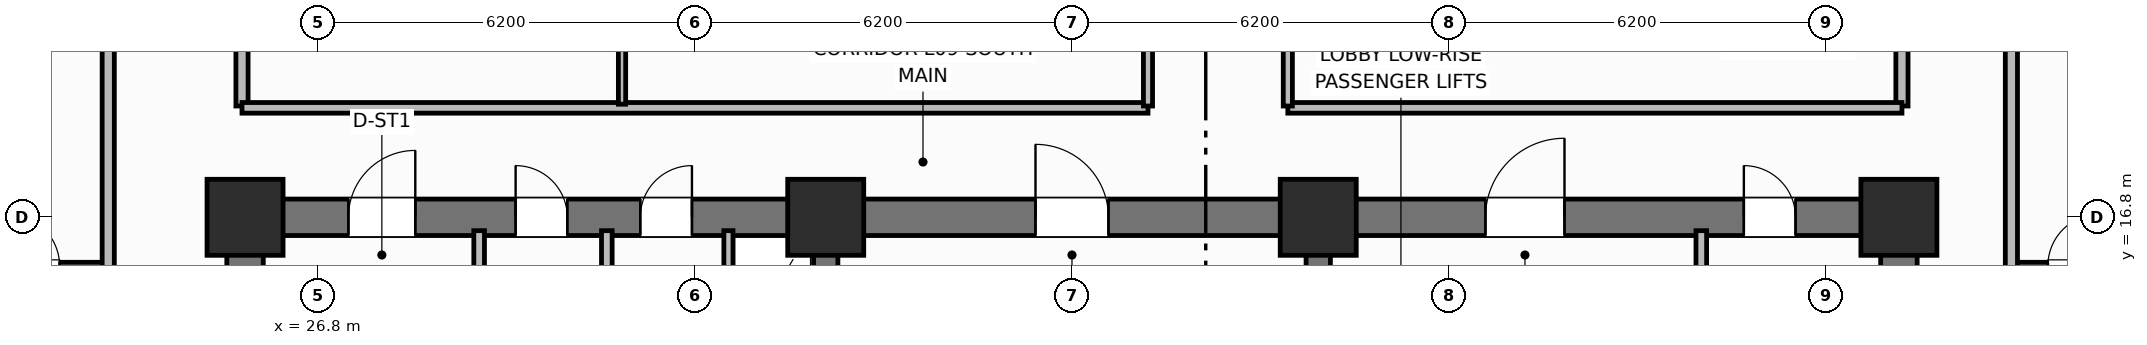
"""IFC4 building model, lengths in metres.
Left out: names, types, materials, properties, quantities, classifications, styles, units other than length and angle.
Written with IfcOpenShell. Run it as: python <this file> out.ifc"""

import sys

from ifc_helpers import new_model, si_unit, direction, frame, frame_2d, origin, origin_2d, place, context, subcontext, project, spatial, rectangle, extrude, element, fill, save


model = new_model("IFC4")
c1 = context("Model", 3, precision=1e-05, world=origin(), true_north=direction((0.0, 1.0)))
c2 = subcontext(c1, "Body", "Model", "MODEL_VIEW")
j1 = project(units=[si_unit("LENGTHUNIT", "METRE"), si_unit("PLANEANGLEUNIT", "RADIAN")], contexts=[c1])
p1 = place(None, origin())
s1 = spatial("IfcSite", under=j1, at=p1, CompositionType="ELEMENT")
p2 = place(p1, origin())
s2 = spatial("IfcBuilding", under=s1, at=p2, CompositionType="ELEMENT")
p3 = place(p2, frame((0.0, 0.0, 39.9)))
s3 = spatial("IfcBuildingStorey", under=s2, at=p3, CompositionType="ELEMENT", Elevation=39.9)
for number, where, z_axis, x_axis in (
    (1, (25.6, 10.9, 0.0), (0.0, 0.0, 1.0), (0.0, 1.0, 0.0)),
    (2, (52.8, 10.9, 0.0), (0.0, 0.0, 1.0), (0.0, 1.0, 0.0)),
):
    element("IfcWall", number, at=place(p3, frame(where, z_axis=z_axis, x_axis=x_axis)), inside=s3, PredefinedType="SHEAR", context=c2, shape_type="SweptSolid", body=[
        extrude(rectangle(XDim=5.6, YDim=0.6, at=frame_2d((2.8, 0.0))), origin(), (0.0, 0.0, 1.0), 3.7),
    ])
p4 = place(p3, frame((25.6, 16.8, 0.0), z_axis=(0.0, 0.0, 1.0), x_axis=(1.0, 0.0, 0.0)))
e3 = element("IfcWall", 3, at=p4, inside=s3, PredefinedType="SHEAR", context=c2, shape_type="SweptSolid", body=[
    extrude(rectangle(XDim=27.2, YDim=0.6, at=frame_2d((13.6, 0.0))), origin(), (0.0, 0.0, 1.0), 3.7),
])
p5 = place(p4, frame((1.7, 0.0, 0.0)))
e4 = element("IfcOpeningElement", 4, at=p5, cuts=e3, PredefinedType="OPENING", context=c2, shape_type="SweptSolid", body=[
    extrude(rectangle(XDim=1.1, YDim=2.15, at=frame_2d((0.55, 1.075))), frame((0.0, 0.31, 0.0), z_axis=(0.0, -1.0, 0.0), x_axis=(1.0, 0.0, 0.0)), (0.0, 0.0, 1.0), 0.62),
])
p6 = place(p4, frame((4.45, 0.0, 0.0)))
e5 = element("IfcOpeningElement", 5, at=p6, cuts=e3, PredefinedType="OPENING", context=c2, shape_type="SweptSolid", body=[
    extrude(rectangle(XDim=0.85, YDim=2.1, at=frame_2d((0.425, 1.05))), frame((0.0, 0.31, 0.0), z_axis=(0.0, -1.0, 0.0), x_axis=(1.0, 0.0, 0.0)), (0.0, 0.0, 1.0), 0.62),
])
p7 = place(p4, frame((6.5, 0.0, 0.0)))
e6 = element("IfcOpeningElement", 6, at=p7, cuts=e3, PredefinedType="OPENING", context=c2, shape_type="SweptSolid", body=[
    extrude(rectangle(XDim=0.85, YDim=2.1, at=frame_2d((0.425, 1.05))), frame((0.0, 0.31, 0.0), z_axis=(0.0, -1.0, 0.0), x_axis=(1.0, 0.0, 0.0)), (0.0, 0.0, 1.0), 0.62),
])
p8 = place(p4, frame((13.0, 0.0, 0.0)))
e7 = element("IfcOpeningElement", 7, at=p8, cuts=e3, PredefinedType="OPENING", context=c2, shape_type="SweptSolid", body=[
    extrude(rectangle(XDim=1.2, YDim=2.15, at=frame_2d((0.6, 1.075))), frame((0.0, 0.31, 0.0), z_axis=(0.0, -1.0, 0.0), x_axis=(1.0, 0.0, 0.0)), (0.0, 0.0, 1.0), 0.62),
])
p9 = place(p4, frame((20.4, 0.0, 0.0)))
e8 = element("IfcOpeningElement", 8, at=p9, cuts=e3, PredefinedType="OPENING", context=c2, shape_type="SweptSolid", body=[
    extrude(rectangle(XDim=1.3, YDim=2.2, at=frame_2d((0.65, 1.1))), frame((0.0, 0.31, 0.0), z_axis=(0.0, -1.0, 0.0), x_axis=(1.0, 0.0, 0.0)), (0.0, 0.0, 1.0), 0.62),
])
p10 = place(p4, frame((24.65, 0.0, 0.0)))
e9 = element("IfcOpeningElement", 9, at=p10, cuts=e3, PredefinedType="OPENING", context=c2, shape_type="SweptSolid", body=[
    extrude(rectangle(XDim=0.85, YDim=2.1, at=frame_2d((0.425, 1.05))), frame((0.0, 0.31, 0.0), z_axis=(0.0, -1.0, 0.0), x_axis=(1.0, 0.0, 0.0)), (0.0, 0.0, 1.0), 0.62),
])
for number, where, z_axis, x_axis in (
    (10, (35.15, 10.9, 0.0), (0.0, 0.0, 1.0), (0.0, 1.0, 0.0)),
    (11, (43.25, 10.9, 0.0), (0.0, 0.0, 1.0), (0.0, 1.0, 0.0)),
):
    element("IfcWall", number, at=place(p3, frame(where, z_axis=z_axis, x_axis=x_axis)), inside=s3, PredefinedType="SHEAR", context=c2, shape_type="SweptSolid", body=[
        extrude(rectangle(XDim=5.6, YDim=0.4, at=frame_2d((2.8, 0.0))), origin(), (0.0, 0.0, 1.0), 3.7),
    ])
for number, where, z_axis, x_axis in (
    (12, (25.6, 16.8, 0.0), (0.0, 0.0, 1.0), (1.0, 0.0, 0.0)),
    (13, (35.15, 16.8, 0.0), (0.0, 0.0, 1.0), (1.0, 0.0, 0.0)),
    (14, (43.25, 16.8, 0.0), (0.0, 0.0, 1.0), (1.0, 0.0, 0.0)),
    (15, (52.8, 16.8, 0.0), (0.0, 0.0, 1.0), (1.0, 0.0, 0.0)),
):
    element("IfcColumn", number, at=place(p3, frame(where, z_axis=z_axis, x_axis=x_axis)), inside=s3, PredefinedType="COLUMN", context=c2, shape_type="SweptSolid", body=[
        extrude(rectangle(XDim=1.25, YDim=1.25, at=origin_2d()), origin(), (0.0, 0.0, 1.0), 3.7),
    ])
for number, where, z_axis, x_axis in (
    (16, (29.45, 14.5, 0.0), (0.0, 0.0, 1.0), (0.0, 1.0, 0.0)),
    (17, (31.55, 14.5, 0.0), (0.0, 0.0, 1.0), (0.0, 1.0, 0.0)),
):
    element("IfcWall", number, at=place(p3, frame(where, z_axis=z_axis, x_axis=x_axis)), inside=s3, PredefinedType="PARTITIONING", context=c2, shape_type="SweptSolid", body=[
        extrude(rectangle(XDim=2.08, YDim=0.175, at=frame_2d((1.04, 0.0))), origin(), (0.0, 0.0, 1.0), 2.53),
    ])
p11 = place(p3, frame((33.55, 14.5, 0.0), z_axis=(0.0, 0.0, 1.0), x_axis=(0.0, 1.0, 0.0)))
e18 = element("IfcWall", 18, at=p11, inside=s3, PredefinedType="PARTITIONING", context=c2, shape_type="SweptSolid", body=[
    extrude(rectangle(XDim=2.08, YDim=0.15, at=frame_2d((1.04, 0.0))), origin(), (0.0, 0.0, 1.0), 2.53),
])
p12 = place(p11, frame((0.55, 0.0, 0.0)))
e19 = element("IfcOpeningElement", 19, at=p12, cuts=e18, PredefinedType="OPENING", context=c2, shape_type="SweptSolid", body=[
    extrude(rectangle(XDim=0.85, YDim=2.05, at=frame_2d((0.425, 1.025))), frame((0.0, 0.085, 0.0), z_axis=(0.0, -1.0, 0.0), x_axis=(1.0, 0.0, 0.0)), (0.0, 0.0, 1.0), 0.17),
])
p13 = place(p3, frame((49.55, 13.7, 0.0), z_axis=(0.0, 0.0, 1.0), x_axis=(0.0, 1.0, 0.0)))
e20 = element("IfcWall", 20, at=p13, inside=s3, PredefinedType="PARTITIONING", context=c2, shape_type="SweptSolid", body=[
    extrude(rectangle(XDim=2.88, YDim=0.175, at=frame_2d((1.44, 0.0))), origin(), (0.0, 0.0, 1.0), 2.53),
])
for number, where, z_axis, x_axis in (
    (21, (25.55, 18.63, 0.0), (0.0, 0.0, 1.0), (0.0, 1.0, 0.0)),
    (22, (52.85, 18.63, 0.0), (0.0, 0.0, 1.0), (0.0, 1.0, 0.0)),
):
    element("IfcWall", number, at=place(p3, frame(where, z_axis=z_axis, x_axis=x_axis)), inside=s3, PredefinedType="PARTITIONING", context=c2, shape_type="SweptSolid", body=[
        extrude(rectangle(XDim=19.14, YDim=0.2, at=frame_2d((9.57, 0.0))), origin(), (0.0, 0.0, 1.0), 2.53),
    ])
p14 = place(p3, frame((25.55, 18.6, 0.0), z_axis=(0.0, 0.0, 1.0), x_axis=(1.0, 0.0, 0.0)))
e23 = element("IfcWall", 23, at=p14, inside=s3, PredefinedType="PARTITIONING", context=c2, shape_type="SweptSolid", body=[
    extrude(rectangle(XDim=14.9, YDim=0.175, at=frame_2d((7.45, 0.0))), origin(), (0.0, 0.0, 1.0), 2.53),
])
p15 = place(p3, frame((42.75, 18.6, 0.0), z_axis=(0.0, 0.0, 1.0), x_axis=(1.0, 0.0, 0.0)))
e24 = element("IfcWall", 24, at=p15, inside=s3, PredefinedType="PARTITIONING", context=c2, shape_type="SweptSolid", body=[
    extrude(rectangle(XDim=10.1, YDim=0.175, at=frame_2d((5.05, 0.0))), origin(), (0.0, 0.0, 1.0), 2.53),
])
p16 = place(p3, frame((31.8, 18.66, 0.0), z_axis=(0.0, 0.0, 1.0), x_axis=(0.0, 1.0, 0.0)))
e25 = element("IfcWall", 25, at=p16, inside=s3, PredefinedType="PARTITIONING", context=c2, shape_type="SweptSolid", body=[
    extrude(rectangle(XDim=9.49, YDim=0.12, at=frame_2d((4.745, 0.0))), origin(), (0.0, 0.0, 1.0), 2.53),
])
p17 = place(p16, frame((2.2, 0.0, 0.0)))
e26 = element("IfcOpeningElement", 26, at=p17, cuts=e25, PredefinedType="OPENING", context=c2, shape_type="SweptSolid", body=[
    extrude(rectangle(XDim=0.9, YDim=2.1, at=frame_2d((0.45, 1.05))), frame((0.0, 0.07, 0.0), z_axis=(0.0, -1.0, 0.0), x_axis=(1.0, 0.0, 0.0)), (0.0, 0.0, 1.0), 0.14),
])
p18 = place(p3, frame((40.45, 18.63, 0.0), z_axis=(0.0, 0.0, 1.0), x_axis=(0.0, 1.0, 0.0)))
e27 = element("IfcWall", 27, at=p18, inside=s3, PredefinedType="PARTITIONING", context=c2, shape_type="SweptSolid", body=[
    extrude(rectangle(XDim=19.14, YDim=0.15, at=frame_2d((9.57, 0.0))), origin(), (0.0, 0.0, 1.0), 2.53),
])
p19 = place(p18, frame((2.4, 0.0, 0.0)))
e28 = element("IfcOpeningElement", 28, at=p19, cuts=e27, PredefinedType="OPENING", context=c2, shape_type="SweptSolid", body=[
    extrude(rectangle(XDim=1.0, YDim=2.15, at=frame_2d((0.5, 1.075))), frame((0.0, 0.085, 0.0), z_axis=(0.0, -1.0, 0.0), x_axis=(1.0, 0.0, 0.0)), (0.0, 0.0, 1.0), 0.17),
])
p20 = place(p18, frame((11.4, 0.0, 0.0)))
e29 = element("IfcOpeningElement", 29, at=p20, cuts=e27, PredefinedType="OPENING", context=c2, shape_type="SweptSolid", body=[
    extrude(rectangle(XDim=1.0, YDim=2.15, at=frame_2d((0.5, 1.075))), frame((0.0, 0.085, 0.0), z_axis=(0.0, -1.0, 0.0), x_axis=(1.0, 0.0, 0.0)), (0.0, 0.0, 1.0), 0.17),
])
p21 = place(p3, frame((42.75, 18.63, 0.0), z_axis=(0.0, 0.0, 1.0), x_axis=(0.0, 1.0, 0.0)))
e30 = element("IfcWall", 30, at=p21, inside=s3, PredefinedType="PARTITIONING", context=c2, shape_type="SweptSolid", body=[
    extrude(rectangle(XDim=19.14, YDim=0.15, at=frame_2d((9.57, 0.0))), origin(), (0.0, 0.0, 1.0), 2.53),
])
p22 = place(p21, frame((5.5, 0.0, 0.0)))
e31 = element("IfcOpeningElement", 31, at=p22, cuts=e30, PredefinedType="OPENING", context=c2, shape_type="SweptSolid", body=[
    extrude(rectangle(XDim=1.0, YDim=2.15, at=frame_2d((0.5, 1.075))), frame((0.0, 0.085, 0.0), z_axis=(0.0, -1.0, 0.0), x_axis=(1.0, 0.0, 0.0)), (0.0, 0.0, 1.0), 0.17),
])
p23 = place(p3, frame((21.1, 16.0, 0.0), z_axis=(0.0, 0.0, 1.0), x_axis=(1.0, 0.0, 0.0)))
e32 = element("IfcWall", 32, at=p23, inside=s3, PredefinedType="PARTITIONING", context=c2, shape_type="SweptSolid", body=[
    extrude(rectangle(XDim=2.25, YDim=0.12, at=frame_2d((1.125, 0.0))), origin(), (0.0, 0.0, 1.0), 2.53),
])
p24 = place(p23, frame((0.6, 0.0, 0.0)))
e33 = element("IfcOpeningElement", 33, at=p24, cuts=e32, PredefinedType="OPENING", context=c2, shape_type="SweptSolid", body=[
    extrude(rectangle(XDim=0.85, YDim=2.1, at=frame_2d((0.425, 1.05))), frame((0.0, 0.07, 0.0), z_axis=(0.0, -1.0, 0.0), x_axis=(1.0, 0.0, 0.0)), (0.0, 0.0, 1.0), 0.14),
])
p25 = place(p3, frame((23.35, 10.6, 0.0), z_axis=(0.0, 0.0, 1.0), x_axis=(0.0, 1.0, 0.0)))
e34 = element("IfcWall", 34, at=p25, inside=s3, PredefinedType="PARTITIONING", context=c2, shape_type="SweptSolid", body=[
    extrude(rectangle(XDim=35.2, YDim=0.2, at=frame_2d((17.6, 0.0))), origin(), (0.0, 0.0, 1.0), 2.53),
])
p26 = place(p25, frame((2.65, 0.0, 0.0)))
e35 = element("IfcOpeningElement", 35, at=p26, cuts=e34, PredefinedType="OPENING", context=c2, shape_type="SweptSolid", body=[
    extrude(rectangle(XDim=1.0, YDim=2.15, at=frame_2d((0.5, 1.075))), frame((0.0, 0.11, 0.0), z_axis=(0.0, -1.0, 0.0), x_axis=(1.0, 0.0, 0.0)), (0.0, 0.0, 1.0), 0.22),
])
p27 = place(p25, frame((12.65, 0.0, 0.0)))
e36 = element("IfcOpeningElement", 36, at=p27, cuts=e34, PredefinedType="OPENING", context=c2, shape_type="SweptSolid", body=[
    extrude(rectangle(XDim=1.0, YDim=2.15, at=frame_2d((0.5, 1.075))), frame((0.0, 0.11, 0.0), z_axis=(0.0, -1.0, 0.0), x_axis=(1.0, 0.0, 0.0)), (0.0, 0.0, 1.0), 0.22),
])
p28 = place(p25, frame((24.134, 0.0, 0.0)))
e37 = element("IfcOpeningElement", 37, at=p28, cuts=e34, PredefinedType="OPENING", context=c2, shape_type="SweptSolid", body=[
    extrude(rectangle(XDim=1.0, YDim=2.15, at=frame_2d((0.5, 1.075))), frame((0.0, 0.11, 0.0), z_axis=(0.0, -1.0, 0.0), x_axis=(1.0, 0.0, 0.0)), (0.0, 0.0, 1.0), 0.22),
])
p29 = place(p3, frame((54.65, 16.0, 0.0), z_axis=(0.0, 0.0, 1.0), x_axis=(1.0, 0.0, 0.0)))
e38 = element("IfcWall", 38, at=p29, inside=s3, PredefinedType="PARTITIONING", context=c2, shape_type="SweptSolid", body=[
    extrude(rectangle(XDim=2.25, YDim=0.12, at=frame_2d((1.125, 0.0))), origin(), (0.0, 0.0, 1.0), 2.53),
])
p30 = place(p29, frame((0.6, 0.0, 0.0)))
e39 = element("IfcOpeningElement", 39, at=p30, cuts=e38, PredefinedType="OPENING", context=c2, shape_type="SweptSolid", body=[
    extrude(rectangle(XDim=0.85, YDim=2.1, at=frame_2d((0.425, 1.05))), frame((0.0, 0.07, 0.0), z_axis=(0.0, -1.0, 0.0), x_axis=(1.0, 0.0, 0.0)), (0.0, 0.0, 1.0), 0.14),
])
p31 = place(p3, frame((54.65, 10.6, 0.0), z_axis=(0.0, 0.0, 1.0), x_axis=(0.0, 1.0, 0.0)))
e40 = element("IfcWall", 40, at=p31, inside=s3, PredefinedType="PARTITIONING", context=c2, shape_type="SweptSolid", body=[
    extrude(rectangle(XDim=35.2, YDim=0.2, at=frame_2d((17.6, 0.0))), origin(), (0.0, 0.0, 1.0), 2.53),
])
p32 = place(p31, frame((2.65, 0.0, 0.0)))
e41 = element("IfcOpeningElement", 41, at=p32, cuts=e40, PredefinedType="OPENING", context=c2, shape_type="SweptSolid", body=[
    extrude(rectangle(XDim=1.0, YDim=2.15, at=frame_2d((0.5, 1.075))), frame((0.0, 0.11, 0.0), z_axis=(0.0, -1.0, 0.0), x_axis=(1.0, 0.0, 0.0)), (0.0, 0.0, 1.0), 0.22),
])
p33 = place(p31, frame((19.95, 0.0, 0.0)))
e42 = element("IfcOpeningElement", 42, at=p33, cuts=e40, PredefinedType="OPENING", context=c2, shape_type="SweptSolid", body=[
    extrude(rectangle(XDim=1.0, YDim=2.15, at=frame_2d((0.5, 1.075))), frame((0.0, 0.11, 0.0), z_axis=(0.0, -1.0, 0.0), x_axis=(1.0, 0.0, 0.0)), (0.0, 0.0, 1.0), 0.22),
])
p34 = place(p24, origin())
e43 = element("IfcDoor", 43, at=p34, inside=s3, OperationType="SINGLE_SWING_LEFT", PredefinedType="DOOR", context=c2, shape_type="SweptSolid", body=[
    extrude(rectangle(XDim=0.85, YDim=2.1, at=frame_2d((0.425, 1.05))), frame((0.0, 0.025, 0.0), z_axis=(0.0, -1.0, 0.0), x_axis=(1.0, 0.0, 0.0)), (0.0, 0.0, 1.0), 0.05),
])
fill(e33, e43)
p35 = place(p30, origin())
e44 = element("IfcDoor", 44, at=p35, inside=s3, OperationType="SINGLE_SWING_RIGHT", PredefinedType="DOOR", context=c2, shape_type="SweptSolid", body=[
    extrude(rectangle(XDim=0.85, YDim=2.1, at=frame_2d((0.425, 1.05))), frame((0.0, 0.025, 0.0), z_axis=(0.0, -1.0, 0.0), x_axis=(1.0, 0.0, 0.0)), (0.0, 0.0, 1.0), 0.05),
])
fill(e39, e44)
p36 = place(p5, origin())
e45 = element("IfcDoor", 45, at=p36, inside=s3, OperationType="SINGLE_SWING_RIGHT", PredefinedType="DOOR", context=c2, shape_type="SweptSolid", body=[
    extrude(rectangle(XDim=1.1, YDim=2.15, at=frame_2d((0.55, 1.075))), frame((0.0, 0.025, 0.0), z_axis=(0.0, -1.0, 0.0), x_axis=(1.0, 0.0, 0.0)), (0.0, 0.0, 1.0), 0.05),
])
fill(e4, e45)
p37 = place(p6, origin())
e46 = element("IfcDoor", 46, at=p37, inside=s3, OperationType="SINGLE_SWING_LEFT", PredefinedType="DOOR", context=c2, shape_type="SweptSolid", body=[
    extrude(rectangle(XDim=0.85, YDim=2.1, at=frame_2d((0.425, 1.05))), frame((0.0, 0.025, 0.0), z_axis=(0.0, -1.0, 0.0), x_axis=(1.0, 0.0, 0.0)), (0.0, 0.0, 1.0), 0.05),
])
fill(e5, e46)
p38 = place(p7, origin())
e47 = element("IfcDoor", 47, at=p38, inside=s3, OperationType="SINGLE_SWING_RIGHT", PredefinedType="DOOR", context=c2, shape_type="SweptSolid", body=[
    extrude(rectangle(XDim=0.85, YDim=2.1, at=frame_2d((0.425, 1.05))), frame((0.0, 0.025, 0.0), z_axis=(0.0, -1.0, 0.0), x_axis=(1.0, 0.0, 0.0)), (0.0, 0.0, 1.0), 0.05),
])
fill(e6, e47)
p39 = place(p8, origin())
e48 = element("IfcDoor", 48, at=p39, inside=s3, OperationType="SINGLE_SWING_LEFT", PredefinedType="DOOR", context=c2, shape_type="SweptSolid", body=[
    extrude(rectangle(XDim=1.2, YDim=2.15, at=frame_2d((0.6, 1.075))), frame((0.0, 0.025, 0.0), z_axis=(0.0, -1.0, 0.0), x_axis=(1.0, 0.0, 0.0)), (0.0, 0.0, 1.0), 0.05),
])
fill(e7, e48)
p40 = place(p9, origin())
e49 = element("IfcDoor", 49, at=p40, inside=s3, OperationType="SINGLE_SWING_RIGHT", PredefinedType="DOOR", context=c2, shape_type="SweptSolid", body=[
    extrude(rectangle(XDim=1.3, YDim=2.2, at=frame_2d((0.65, 1.1))), frame((0.0, 0.025, 0.0), z_axis=(0.0, -1.0, 0.0), x_axis=(1.0, 0.0, 0.0)), (0.0, 0.0, 1.0), 0.05),
])
fill(e8, e49)
p41 = place(p10, origin())
e50 = element("IfcDoor", 50, at=p41, inside=s3, OperationType="SINGLE_SWING_LEFT", PredefinedType="DOOR", context=c2, shape_type="SweptSolid", body=[
    extrude(rectangle(XDim=0.85, YDim=2.1, at=frame_2d((0.425, 1.05))), frame((0.0, 0.025, 0.0), z_axis=(0.0, -1.0, 0.0), x_axis=(1.0, 0.0, 0.0)), (0.0, 0.0, 1.0), 0.05),
])
fill(e9, e50)
save(model, sys.argv[1])
